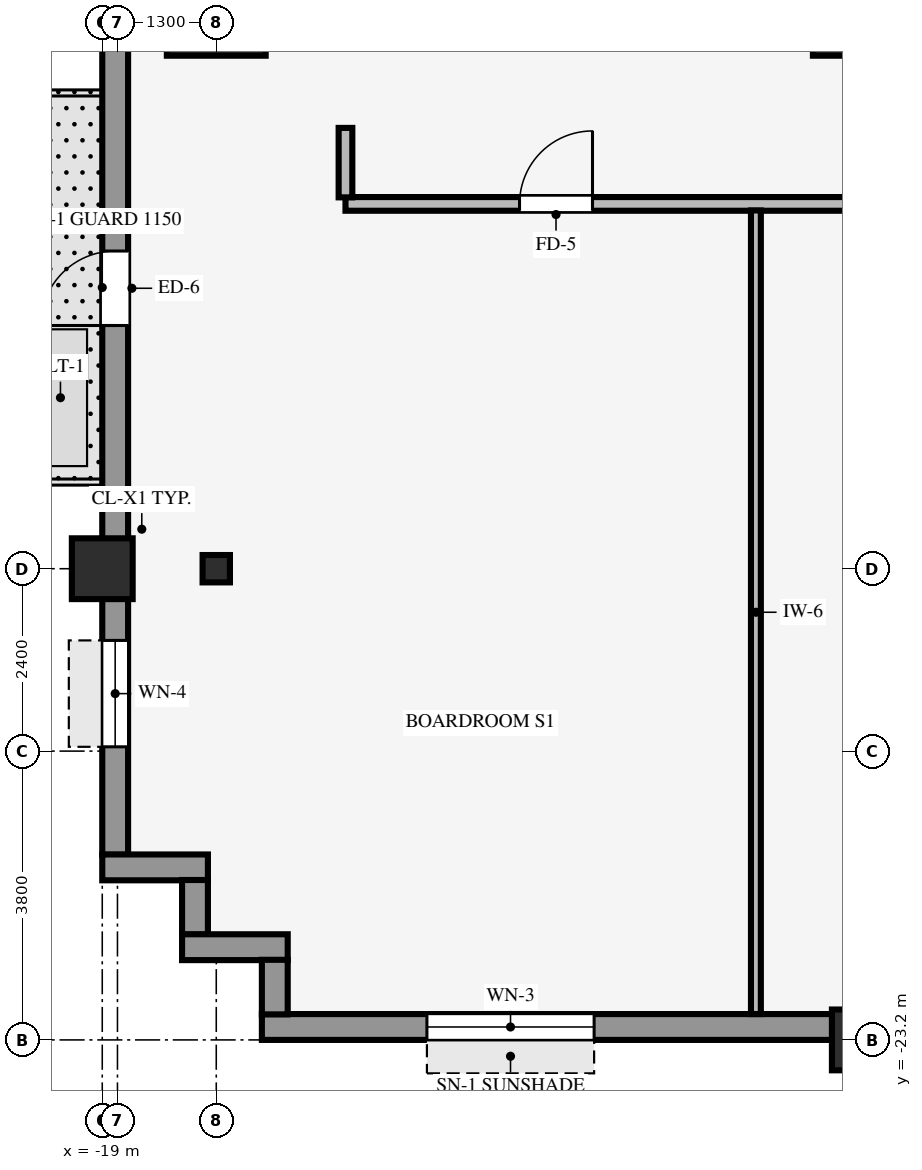
"""IFC4 building model, lengths in metres.
Left out: names, types, materials, properties, quantities, classifications, styles, units other than length and angle.
Written with IfcOpenShell. Run it as: python <this file> out.ifc"""

import sys

from ifc_helpers import new_model, si_unit, direction, frame, frame_2d, origin, origin_2d, place, context, subcontext, project, spatial, rectangle, hollow_rectangle, i_section, extrude, source, transform, mapped, element, fill, save


model = new_model("IFC4")
c1 = context("Model", 3, precision=1e-05, world=origin(), true_north=direction((0.0, 1.0)))
c2 = subcontext(c1, "Body", "Model", "MODEL_VIEW")
j1 = project(units=[si_unit("LENGTHUNIT", "METRE"), si_unit("PLANEANGLEUNIT", "RADIAN")], contexts=[c1])
p1 = place(None, origin())
s1 = spatial("IfcSite", under=j1, at=p1, CompositionType="ELEMENT")
p2 = place(p1, origin())
s2 = spatial("IfcBuilding", under=s1, at=p2, CompositionType="ELEMENT")
p3 = place(p2, frame((0.0, 0.0, 42.2)))
s3 = spatial("IfcBuildingStorey", under=s2, at=p3, CompositionType="ELEMENT", Elevation=42.2)
for number, where, z_axis, x_axis in (
    (1, (-17.5, -9.6, 0.0), (0.0, 0.0, 1.0), (1.0, 0.0, 0.0)),
    (2, (-9.0, -9.6, 0.0), (0.0, 0.0, 1.0), (1.0, 0.0, 0.0)),
):
    element("IfcColumn", number, at=place(p3, frame(where, z_axis=z_axis, x_axis=x_axis)), inside=s3, PredefinedType="COLUMN", context=c2, shape_type="SweptSolid", body=[
        extrude(rectangle(XDim=1.3, YDim=1.3, at=origin_2d()), origin(), (0.0, 0.0, 1.0), 3.37),
    ])
for number, where, z_axis, x_axis in (
    (3, (-19.0, -17.0, 0.0), (0.0, 0.0, 1.0), (1.0, 0.0, 0.0)),
    (4, (-9.0, -23.2, 0.0), (0.0, 0.0, 1.0), (1.0, 0.0, 0.0)),
):
    element("IfcColumn", number, at=place(p3, frame(where, z_axis=z_axis, x_axis=x_axis)), inside=s3, PredefinedType="COLUMN", context=c2, shape_type="SweptSolid", body=[
        extrude(hollow_rectangle(XDim=0.8, YDim=0.8, WallThickness=0.055, InnerFilletRadius=0.055, OuterFilletRadius=0.11, at=origin_2d()), origin(), (0.0, 0.0, 1.0), 3.37),
    ])
p4 = place(p3, frame((-17.5, -17.0, 0.0), z_axis=(0.0, 0.0, 1.0), x_axis=(1.0, 0.0, 0.0)))
e5 = element("IfcColumn", 5, at=p4, inside=s3, PredefinedType="COLUMN", context=c2, shape_type="SweptSolid", body=[
    extrude(i_section(OverallWidth=0.36, OverallDepth=0.36, WebThickness=0.021, FlangeThickness=0.021, FilletRadius=0.018, at=origin_2d()), origin(), (0.0, 0.0, 1.0), 3.37),
])
p5 = place(p3, frame((-16.9, -23.03, 0.0), z_axis=(0.0, 0.0, 1.0), x_axis=(1.0, 0.0, 0.0)))
e6 = element("IfcWall", 6, at=p5, inside=s3, PredefinedType="STANDARD", context=c2, shape_type="SweptSolid", body=[
    extrude(rectangle(XDim=33.8, YDim=0.34, at=frame_2d((16.9, 0.0))), origin(), (0.0, 0.0, 1.0), 2.705),
])
p6 = place(p5, frame((2.171, 0.0, 0.8)))
e7 = element("IfcOpeningElement", 7, at=p6, cuts=e6, PredefinedType="OPENING", context=c2, shape_type="SweptSolid", body=[
    extrude(rectangle(XDim=2.2, YDim=1.65, at=frame_2d((1.1, 0.825))), frame((0.0, 0.18, 0.0), z_axis=(0.0, -1.0, 0.0), x_axis=(1.0, 0.0, 0.0)), (0.0, 0.0, 1.0), 0.36),
])
p7 = place(p5, frame((11.257, 0.0, 0.8)))
e8 = element("IfcOpeningElement", 8, at=p7, cuts=e6, PredefinedType="OPENING", context=c2, shape_type="SweptSolid", body=[
    extrude(rectangle(XDim=2.2, YDim=1.65, at=frame_2d((1.1, 0.825))), frame((0.0, 0.18, 0.0), z_axis=(0.0, -1.0, 0.0), x_axis=(1.0, 0.0, 0.0)), (0.0, 0.0, 1.0), 0.36),
])
p8 = place(p5, frame((20.343, 0.0, 0.8)))
e9 = element("IfcOpeningElement", 9, at=p8, cuts=e6, PredefinedType="OPENING", context=c2, shape_type="SweptSolid", body=[
    extrude(rectangle(XDim=2.2, YDim=1.65, at=frame_2d((1.1, 0.825))), frame((0.0, 0.18, 0.0), z_axis=(0.0, -1.0, 0.0), x_axis=(1.0, 0.0, 0.0)), (0.0, 0.0, 1.0), 0.36),
])
p9 = place(p5, frame((28.979, 0.0, 0.8)))
e10 = element("IfcOpeningElement", 10, at=p9, cuts=e6, PredefinedType="OPENING", context=c2, shape_type="SweptSolid", body=[
    extrude(rectangle(XDim=2.2, YDim=1.65, at=frame_2d((1.1, 0.825))), frame((0.0, 0.18, 0.0), z_axis=(0.0, -1.0, 0.0), x_axis=(1.0, 0.0, 0.0)), (0.0, 0.0, 1.0), 0.36),
])
p10 = place(p3, frame((-18.83, -20.764, 0.0), z_axis=(0.0, 0.0, 1.0), x_axis=(0.0, 1.0, 0.0)))
e11 = element("IfcWall", 11, at=p10, inside=s3, PredefinedType="STANDARD", context=c2, shape_type="SweptSolid", body=[
    extrude(rectangle(XDim=41.528, YDim=0.34, at=frame_2d((20.764, 0.0))), origin(), (0.0, 0.0, 1.0), 2.705),
])
p11 = place(p10, frame((6.964, 0.0, 0.0)))
e12 = element("IfcOpeningElement", 12, at=p11, cuts=e11, PredefinedType="OPENING", context=c2, shape_type="SweptSolid", body=[
    extrude(rectangle(XDim=0.98, YDim=2.15, at=frame_2d((0.49, 1.075))), frame((0.0, 0.18, 0.0), z_axis=(0.0, -1.0, 0.0), x_axis=(1.0, 0.0, 0.0)), (0.0, 0.0, 1.0), 0.36),
])
p12 = place(p10, frame((1.42, 0.0, 0.8)))
e13 = element("IfcOpeningElement", 13, at=p12, cuts=e11, PredefinedType="OPENING", context=c2, shape_type="SweptSolid", body=[
    extrude(rectangle(XDim=1.4, YDim=1.65, at=frame_2d((0.7, 0.825))), frame((0.0, 0.18, 0.0), z_axis=(0.0, -1.0, 0.0), x_axis=(1.0, 0.0, 0.0)), (0.0, 0.0, 1.0), 0.36),
])
p13 = place(p10, frame((32.417, 0.0, 0.8)))
e14 = element("IfcOpeningElement", 14, at=p13, cuts=e11, PredefinedType="OPENING", context=c2, shape_type="SweptSolid", body=[
    extrude(rectangle(XDim=1.4, YDim=1.65, at=frame_2d((0.7, 0.825))), frame((0.0, 0.18, 0.0), z_axis=(0.0, -1.0, 0.0), x_axis=(1.0, 0.0, 0.0)), (0.0, 0.0, 1.0), 0.36),
])
p14 = place(p10, frame((38.708, 0.0, 0.8)))
e15 = element("IfcOpeningElement", 15, at=p14, cuts=e11, PredefinedType="OPENING", context=c2, shape_type="SweptSolid", body=[
    extrude(rectangle(XDim=1.4, YDim=1.65, at=frame_2d((0.7, 0.825))), frame((0.0, 0.18, 0.0), z_axis=(0.0, -1.0, 0.0), x_axis=(1.0, 0.0, 0.0)), (0.0, 0.0, 1.0), 0.36),
])
p15 = place(p3, frame((-19.0, -20.93, 0.0), z_axis=(0.0, 0.0, 1.0), x_axis=(1.0, 0.0, 0.0)))
e16 = element("IfcWall", 16, at=p15, inside=s3, PredefinedType="STANDARD", context=c2, shape_type="SweptSolid", body=[
    extrude(rectangle(XDim=1.39, YDim=0.34, at=frame_2d((0.695, 0.0))), origin(), (0.0, 0.0, 1.0), 3.36),
])
p16 = place(p3, frame((-17.78, -21.814, 0.0), z_axis=(0.0, 0.0, 1.0), x_axis=(0.0, 1.0, 0.0)))
e17 = element("IfcWall", 17, at=p16, inside=s3, PredefinedType="STANDARD", context=c2, shape_type="SweptSolid", body=[
    extrude(rectangle(XDim=0.718, YDim=0.34, at=frame_2d((0.359, 0.0))), origin(), (0.0, 0.0, 1.0), 3.36),
])
p17 = place(p3, frame((-17.95, -21.98, 0.0), z_axis=(0.0, 0.0, 1.0), x_axis=(1.0, 0.0, 0.0)))
e18 = element("IfcWall", 18, at=p17, inside=s3, PredefinedType="STANDARD", context=c2, shape_type="SweptSolid", body=[
    extrude(rectangle(XDim=1.39, YDim=0.34, at=frame_2d((0.695, 0.0))), origin(), (0.0, 0.0, 1.0), 3.36),
])
p18 = place(p3, frame((-16.73, -22.864, 0.0), z_axis=(0.0, 0.0, 1.0), x_axis=(0.0, 1.0, 0.0)))
e19 = element("IfcWall", 19, at=p18, inside=s3, PredefinedType="STANDARD", context=c2, shape_type="SweptSolid", body=[
    extrude(rectangle(XDim=0.718, YDim=0.34, at=frame_2d((0.359, 0.0))), origin(), (0.0, 0.0, 1.0), 3.36),
])
p19 = place(p3, frame((-15.8, -12.2, 0.0), z_axis=(0.0, 0.0, 1.0), x_axis=(1.0, 0.0, 0.0)))
e20 = element("IfcWall", 20, at=p19, inside=s3, PredefinedType="PARTITIONING", context=c2, shape_type="SweptSolid", body=[
    extrude(rectangle(XDim=31.6, YDim=0.18, at=frame_2d((15.8, 0.0))), origin(), (0.0, 0.0, 1.0), 3.36),
])
p20 = place(p19, frame((18.975, 0.0, 0.0)))
e21 = element("IfcOpeningElement", 21, at=p20, cuts=e20, PredefinedType="OPENING", context=c2, shape_type="SweptSolid", body=[
    extrude(rectangle(XDim=0.96, YDim=2.1, at=frame_2d((0.48, 1.05))), frame((0.0, 0.1, 0.0), z_axis=(0.0, -1.0, 0.0), x_axis=(1.0, 0.0, 0.0)), (0.0, 0.0, 1.0), 0.2),
])
p21 = place(p19, frame((8.59, 0.0, 0.0)))
e22 = element("IfcOpeningElement", 22, at=p21, cuts=e20, PredefinedType="OPENING", context=c2, shape_type="SweptSolid", body=[
    extrude(rectangle(XDim=0.96, YDim=2.1, at=frame_2d((0.48, 1.05))), frame((0.0, 0.1, 0.0), z_axis=(0.0, -1.0, 0.0), x_axis=(1.0, 0.0, 0.0)), (0.0, 0.0, 1.0), 0.2),
])
p22 = place(p19, frame((26.795, 0.0, 0.0)))
e23 = element("IfcOpeningElement", 23, at=p22, cuts=e20, PredefinedType="OPENING", context=c2, shape_type="SweptSolid", body=[
    extrude(rectangle(XDim=0.96, YDim=2.1, at=frame_2d((0.48, 1.05))), frame((0.0, 0.1, 0.0), z_axis=(0.0, -1.0, 0.0), x_axis=(1.0, 0.0, 0.0)), (0.0, 0.0, 1.0), 0.2),
])
p23 = place(p19, frame((2.29, 0.0, 0.0)))
e24 = element("IfcOpeningElement", 24, at=p23, cuts=e20, PredefinedType="OPENING", context=c2, shape_type="SweptSolid", body=[
    extrude(rectangle(XDim=0.96, YDim=2.1, at=frame_2d((0.48, 1.05))), frame((0.0, 0.1, 0.0), z_axis=(0.0, -1.0, 0.0), x_axis=(1.0, 0.0, 0.0)), (0.0, 0.0, 1.0), 0.2),
])
p24 = place(p3, frame((-15.8, -12.114, 0.0), z_axis=(0.0, 0.0, 1.0), x_axis=(0.0, 1.0, 0.0)))
e25 = element("IfcWall", 25, at=p24, inside=s3, PredefinedType="PARTITIONING", context=c2, shape_type="SweptSolid", body=[
    extrude(rectangle(XDim=0.914, YDim=0.18, at=frame_2d((0.457, 0.0))), origin(), (0.0, 0.0, 1.0), 3.36),
])
p25 = place(p3, frame((-10.4, -22.86, 0.0), z_axis=(0.0, 0.0, 1.0), x_axis=(0.0, 1.0, 0.0)))
e26 = element("IfcWall", 26, at=p25, inside=s3, PredefinedType="PARTITIONING", context=c2, shape_type="SweptSolid", body=[
    extrude(rectangle(XDim=10.574, YDim=0.13, at=frame_2d((5.287, 0.0))), origin(), (0.0, 0.0, 1.0), 3.36),
])
m1 = source(origin(), c2, "Body", "SweptSolid", [
    extrude(rectangle(XDim=2.2, YDim=1.65, at=frame_2d((1.1, 0.825))), frame((0.0, 0.03, 0.0), z_axis=(0.0, -1.0, 0.0), x_axis=(1.0, 0.0, 0.0)), (0.0, 0.0, 1.0), 0.06),
])
p26 = place(p6, origin())
e27 = element("IfcWindow", 27, at=p26, inside=s3, PartitioningType="SINGLE_PANEL", PredefinedType="WINDOW", context=c2, shape_type="MappedRepresentation", body=[
    mapped(m1, transform((0.0, 0.0, 0.0), scale=1.0)),
])
fill(e7, e27)
m2 = source(origin(), c2, "Body", "SweptSolid", [
    extrude(rectangle(XDim=0.98, YDim=2.15, at=frame_2d((0.49, 1.075))), frame((0.0, 0.025, 0.0), z_axis=(0.0, -1.0, 0.0), x_axis=(1.0, 0.0, 0.0)), (0.0, 0.0, 1.0), 0.05),
])
p27 = place(p11, origin())
e28 = element("IfcDoor", 28, at=p27, inside=s3, OperationType="SINGLE_SWING_LEFT", PredefinedType="DOOR", context=c2, shape_type="MappedRepresentation", body=[
    mapped(m2, transform((0.0, 0.0, 0.0), scale=1.0)),
])
fill(e12, e28)
m3 = source(origin(), c2, "Body", "SweptSolid", [
    extrude(rectangle(XDim=1.4, YDim=1.65, at=frame_2d((0.7, 0.825))), frame((0.0, 0.03, 0.0), z_axis=(0.0, -1.0, 0.0), x_axis=(1.0, 0.0, 0.0)), (0.0, 0.0, 1.0), 0.06),
])
p28 = place(p12, origin())
e29 = element("IfcWindow", 29, at=p28, inside=s3, PartitioningType="SINGLE_PANEL", PredefinedType="WINDOW", context=c2, shape_type="MappedRepresentation", body=[
    mapped(m3, transform((0.0, 0.0, 0.0), scale=1.0)),
])
fill(e13, e29)
m4 = source(origin(), c2, "Body", "SweptSolid", [
    extrude(rectangle(XDim=0.96, YDim=2.1, at=frame_2d((0.48, 1.05))), frame((0.0, 0.025, 0.0), z_axis=(0.0, -1.0, 0.0), x_axis=(1.0, 0.0, 0.0)), (0.0, 0.0, 1.0), 0.05),
])
p29 = place(p23, origin())
e30 = element("IfcDoor", 30, at=p29, inside=s3, OperationType="SINGLE_SWING_RIGHT", PredefinedType="DOOR", context=c2, shape_type="MappedRepresentation", body=[
    mapped(m4, transform((0.0, 0.0, 0.0), scale=1.0)),
])
fill(e24, e30)
save(model, sys.argv[1])
